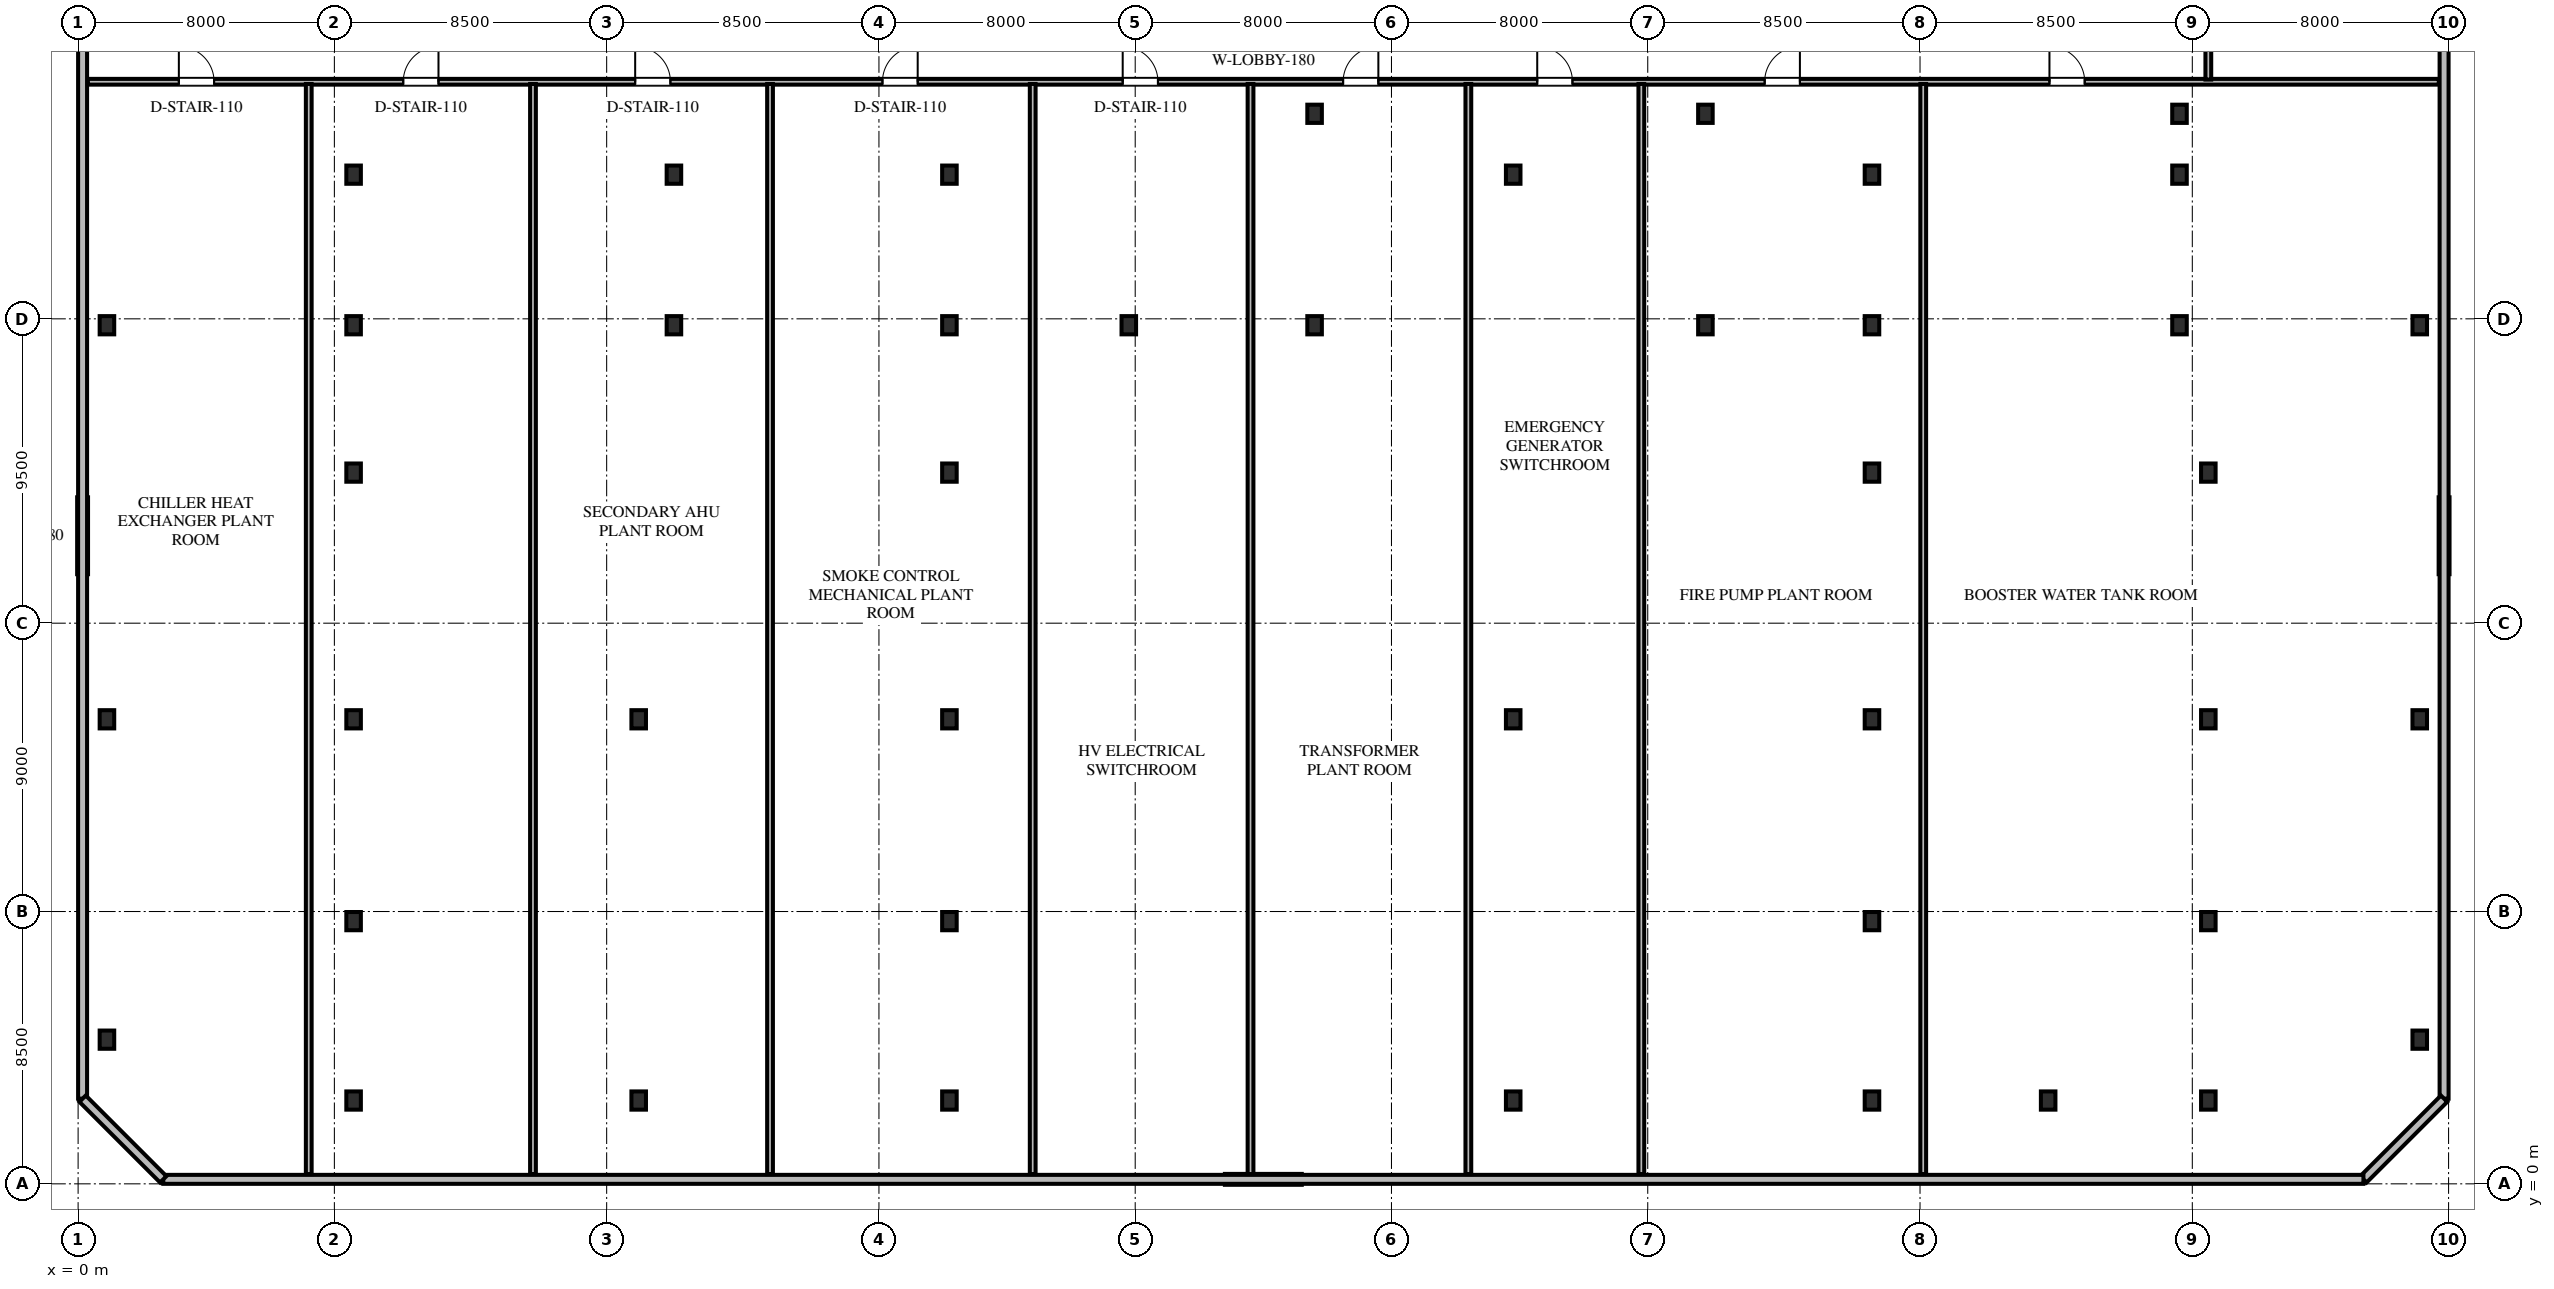
"""IFC4 building model, lengths in metres.
Left out: names, types, materials, properties, quantities, classifications, styles, units other than length and angle.
Written with IfcOpenShell. Run it as: python <this file> out.ifc"""

import sys

from ifc_helpers import new_model, si_unit, direction, frame, frame_2d, origin, origin_2d, place, context, subcontext, project, spatial, rectangle, i_section, extrude, element, fill, save


model = new_model("IFC4")
c1 = context("Model", 3, precision=1e-05, world=origin(), true_north=direction((0.0, 1.0)))
c2 = subcontext(c1, "Body", "Model", "MODEL_VIEW")
j1 = project(units=[si_unit("LENGTHUNIT", "METRE"), si_unit("PLANEANGLEUNIT", "RADIAN")], contexts=[c1])
p1 = place(None, origin())
s1 = spatial("IfcSite", under=j1, at=p1, CompositionType="ELEMENT")
p2 = place(p1, origin())
s2 = spatial("IfcBuilding", under=s1, at=p2, CompositionType="ELEMENT")
p3 = place(p2, frame((0.0, 0.0, 24.3)))
s3 = spatial("IfcBuildingStorey", under=s2, at=p3, CompositionType="ELEMENT", Elevation=24.3)
for number, where, z_axis, x_axis in (
    (1, (8.6, 2.6, 0.0), (0.0, 0.0, 1.0), (1.0, 0.0, 0.0)),
    (2, (17.5, 2.6, 0.0), (0.0, 0.0, 1.0), (1.0, 0.0, 0.0)),
    (3, (27.2, 2.6, 0.0), (0.0, 0.0, 1.0), (1.0, 0.0, 0.0)),
    (4, (44.8, 2.6, 0.0), (0.0, 0.0, 1.0), (1.0, 0.0, 0.0)),
    (5, (56.0, 2.6, 0.0), (0.0, 0.0, 1.0), (1.0, 0.0, 0.0)),
    (6, (61.5, 2.6, 0.0), (0.0, 0.0, 1.0), (1.0, 0.0, 0.0)),
    (7, (66.5, 2.6, 0.0), (0.0, 0.0, 1.0), (1.0, 0.0, 0.0)),
    (8, (8.6, 8.2, 0.0), (0.0, 0.0, 1.0), (1.0, 0.0, 0.0)),
    (9, (27.2, 8.2, 0.0), (0.0, 0.0, 1.0), (1.0, 0.0, 0.0)),
    (10, (56.0, 8.2, 0.0), (0.0, 0.0, 1.0), (1.0, 0.0, 0.0)),
    (11, (66.5, 8.2, 0.0), (0.0, 0.0, 1.0), (1.0, 0.0, 0.0)),
    (12, (8.6, 14.5, 0.0), (0.0, 0.0, 1.0), (1.0, 0.0, 0.0)),
    (13, (17.5, 14.5, 0.0), (0.0, 0.0, 1.0), (1.0, 0.0, 0.0)),
    (14, (27.2, 14.5, 0.0), (0.0, 0.0, 1.0), (1.0, 0.0, 0.0)),
    (15, (44.8, 14.5, 0.0), (0.0, 0.0, 1.0), (1.0, 0.0, 0.0)),
    (16, (56.0, 14.5, 0.0), (0.0, 0.0, 1.0), (1.0, 0.0, 0.0)),
    (17, (66.5, 14.5, 0.0), (0.0, 0.0, 1.0), (1.0, 0.0, 0.0)),
    (18, (8.6, 22.2, 0.0), (0.0, 0.0, 1.0), (1.0, 0.0, 0.0)),
    (19, (27.2, 22.2, 0.0), (0.0, 0.0, 1.0), (1.0, 0.0, 0.0)),
    (20, (56.0, 22.2, 0.0), (0.0, 0.0, 1.0), (1.0, 0.0, 0.0)),
    (21, (66.5, 22.2, 0.0), (0.0, 0.0, 1.0), (1.0, 0.0, 0.0)),
    (22, (8.6, 26.8, 0.0), (0.0, 0.0, 1.0), (1.0, 0.0, 0.0)),
    (23, (18.6, 26.8, 0.0), (0.0, 0.0, 1.0), (1.0, 0.0, 0.0)),
    (24, (27.2, 26.8, 0.0), (0.0, 0.0, 1.0), (1.0, 0.0, 0.0)),
    (25, (32.8, 26.8, 0.0), (0.0, 0.0, 1.0), (1.0, 0.0, 0.0)),
    (26, (38.6, 26.8, 0.0), (0.0, 0.0, 1.0), (1.0, 0.0, 0.0)),
    (27, (50.8, 26.8, 0.0), (0.0, 0.0, 1.0), (1.0, 0.0, 0.0)),
    (28, (56.0, 26.8, 0.0), (0.0, 0.0, 1.0), (1.0, 0.0, 0.0)),
    (29, (65.6, 26.8, 0.0), (0.0, 0.0, 1.0), (1.0, 0.0, 0.0)),
    (30, (8.6, 31.5, 0.0), (0.0, 0.0, 1.0), (1.0, 0.0, 0.0)),
    (31, (18.6, 31.5, 0.0), (0.0, 0.0, 1.0), (1.0, 0.0, 0.0)),
    (32, (27.2, 31.5, 0.0), (0.0, 0.0, 1.0), (1.0, 0.0, 0.0)),
    (33, (44.8, 31.5, 0.0), (0.0, 0.0, 1.0), (1.0, 0.0, 0.0)),
    (34, (56.0, 31.5, 0.0), (0.0, 0.0, 1.0), (1.0, 0.0, 0.0)),
    (35, (65.6, 31.5, 0.0), (0.0, 0.0, 1.0), (1.0, 0.0, 0.0)),
    (36, (0.9, 4.5, 0.0), (0.0, 0.0, 1.0), (1.0, 0.0, 0.0)),
    (37, (0.9, 14.5, 0.0), (0.0, 0.0, 1.0), (1.0, 0.0, 0.0)),
    (38, (0.9, 26.8, 0.0), (0.0, 0.0, 1.0), (1.0, 0.0, 0.0)),
    (39, (73.1, 4.5, 0.0), (0.0, 0.0, 1.0), (1.0, 0.0, 0.0)),
    (40, (73.1, 14.5, 0.0), (0.0, 0.0, 1.0), (1.0, 0.0, 0.0)),
    (41, (73.1, 26.8, 0.0), (0.0, 0.0, 1.0), (1.0, 0.0, 0.0)),
    (42, (38.6, 33.4, 0.0), (0.0, 0.0, 1.0), (1.0, 0.0, 0.0)),
    (43, (50.8, 33.4, 0.0), (0.0, 0.0, 1.0), (1.0, 0.0, 0.0)),
    (44, (65.6, 33.4, 0.0), (0.0, 0.0, 1.0), (1.0, 0.0, 0.0)),
):
    element("IfcColumn", number, at=place(p3, frame(where, z_axis=z_axis, x_axis=x_axis)), inside=s3, PredefinedType="COLUMN", context=c2, shape_type="SweptSolid", body=[
        extrude(i_section(OverallWidth=0.454, OverallDepth=0.569, WebThickness=0.078, FlangeThickness=0.125, FilletRadius=0.03, at=origin_2d()), origin(), (0.0, 0.0, 1.0), 5.2),
    ])
for number, where, z_axis, x_axis in (
    (45, (0.14, 2.658, 0.0), (0.0, 0.0, 1.0), (0.0, 1.0, 0.0)),
    (46, (73.86, 37.8, 0.0), (0.0, 0.0, 1.0), (0.0, -1.0, 0.0)),
):
    element("IfcWall", number, at=place(p3, frame(where, z_axis=z_axis, x_axis=x_axis)), inside=s3, PredefinedType="STANDARD", context=c2, shape_type="SweptSolid", body=[
        extrude(rectangle(XDim=35.142, YDim=0.28, at=frame_2d((17.571, 0.0))), origin(), (0.0, 0.0, 1.0), 4.94),
    ])
p4 = place(p3, frame((73.86, 2.658, 0.0), z_axis=(0.0, 0.0, 1.0), x_axis=(-0.707106781187, -0.707106781187, 0.0)))
e47 = element("IfcWall", 47, at=p4, inside=s3, PredefinedType="STANDARD", context=c2, shape_type="SweptSolid", body=[
    extrude(rectangle(XDim=3.561, YDim=0.28, at=frame_2d((1.781, 0.0))), origin(), (0.0, 0.0, 1.0), 4.94),
])
p5 = place(p3, frame((71.342, 0.14, 0.0), z_axis=(0.0, 0.0, 1.0), x_axis=(-1.0, 0.0, 0.0)))
e48 = element("IfcWall", 48, at=p5, inside=s3, PredefinedType="STANDARD", context=c2, shape_type="SweptSolid", body=[
    extrude(rectangle(XDim=68.684, YDim=0.28, at=frame_2d((34.342, 0.0))), origin(), (0.0, 0.0, 1.0), 4.94),
])
p6 = place(p3, frame((2.658, 0.14, 0.0), z_axis=(0.0, 0.0, 1.0), x_axis=(-0.707106781187, 0.707106781187, 0.0)))
e49 = element("IfcWall", 49, at=p6, inside=s3, PredefinedType="STANDARD", context=c2, shape_type="SweptSolid", body=[
    extrude(rectangle(XDim=3.561, YDim=0.28, at=frame_2d((1.781, 0.0))), origin(), (0.0, 0.0, 1.0), 4.94),
])
p7 = place(p3, frame((0.305, 34.4, 0.0), z_axis=(0.0, 0.0, 1.0), x_axis=(1.0, 0.0, 0.0)))
e50 = element("IfcWall", 50, at=p7, inside=s3, PredefinedType="STANDARD", context=c2, shape_type="SweptSolid", body=[
    extrude(rectangle(XDim=73.39, YDim=0.18, at=frame_2d((36.695, 0.0))), origin(), (0.0, 0.0, 1.0), 3.14),
])
p8 = place(p7, frame((2.84, 0.0, 0.0)))
e51 = element("IfcOpeningElement", 51, at=p8, cuts=e50, PredefinedType="OPENING", context=c2, shape_type="SweptSolid", body=[
    extrude(rectangle(XDim=1.1, YDim=2.2, at=frame_2d((0.55, 1.1))), frame((0.0, 0.1, 0.0), z_axis=(0.0, -1.0, 0.0), x_axis=(1.0, 0.0, 0.0)), (0.0, 0.0, 1.0), 0.2),
])
p9 = place(p7, frame((9.845, 0.0, 0.0)))
e52 = element("IfcOpeningElement", 52, at=p9, cuts=e50, PredefinedType="OPENING", context=c2, shape_type="SweptSolid", body=[
    extrude(rectangle(XDim=1.1, YDim=2.2, at=frame_2d((0.55, 1.1))), frame((0.0, 0.1, 0.0), z_axis=(0.0, -1.0, 0.0), x_axis=(1.0, 0.0, 0.0)), (0.0, 0.0, 1.0), 0.2),
])
p10 = place(p7, frame((17.085, 0.0, 0.0)))
e53 = element("IfcOpeningElement", 53, at=p10, cuts=e50, PredefinedType="OPENING", context=c2, shape_type="SweptSolid", body=[
    extrude(rectangle(XDim=1.1, YDim=2.2, at=frame_2d((0.55, 1.1))), frame((0.0, 0.1, 0.0), z_axis=(0.0, -1.0, 0.0), x_axis=(1.0, 0.0, 0.0)), (0.0, 0.0, 1.0), 0.2),
])
p11 = place(p7, frame((24.805, 0.0, 0.0)))
e54 = element("IfcOpeningElement", 54, at=p11, cuts=e50, PredefinedType="OPENING", context=c2, shape_type="SweptSolid", body=[
    extrude(rectangle(XDim=1.1, YDim=2.2, at=frame_2d((0.55, 1.1))), frame((0.0, 0.1, 0.0), z_axis=(0.0, -1.0, 0.0), x_axis=(1.0, 0.0, 0.0)), (0.0, 0.0, 1.0), 0.2),
])
p12 = place(p7, frame((32.304, 0.0, 0.0)))
e55 = element("IfcOpeningElement", 55, at=p12, cuts=e50, PredefinedType="OPENING", context=c2, shape_type="SweptSolid", body=[
    extrude(rectangle(XDim=1.1, YDim=2.2, at=frame_2d((0.55, 1.1))), frame((0.0, 0.1, 0.0), z_axis=(0.0, -1.0, 0.0), x_axis=(1.0, 0.0, 0.0)), (0.0, 0.0, 1.0), 0.2),
])
p13 = place(p7, frame((39.186, 0.0, 0.0)))
e56 = element("IfcOpeningElement", 56, at=p13, cuts=e50, PredefinedType="OPENING", context=c2, shape_type="SweptSolid", body=[
    extrude(rectangle(XDim=1.1, YDim=2.2, at=frame_2d((0.55, 1.1))), frame((0.0, 0.1, 0.0), z_axis=(0.0, -1.0, 0.0), x_axis=(1.0, 0.0, 0.0)), (0.0, 0.0, 1.0), 0.2),
])
p14 = place(p7, frame((45.245, 0.0, 0.0)))
e57 = element("IfcOpeningElement", 57, at=p14, cuts=e50, PredefinedType="OPENING", context=c2, shape_type="SweptSolid", body=[
    extrude(rectangle(XDim=1.1, YDim=2.2, at=frame_2d((0.55, 1.1))), frame((0.0, 0.1, 0.0), z_axis=(0.0, -1.0, 0.0), x_axis=(1.0, 0.0, 0.0)), (0.0, 0.0, 1.0), 0.2),
])
p15 = place(p7, frame((52.345, 0.0, 0.0)))
e58 = element("IfcOpeningElement", 58, at=p15, cuts=e50, PredefinedType="OPENING", context=c2, shape_type="SweptSolid", body=[
    extrude(rectangle(XDim=1.1, YDim=2.2, at=frame_2d((0.55, 1.1))), frame((0.0, 0.1, 0.0), z_axis=(0.0, -1.0, 0.0), x_axis=(1.0, 0.0, 0.0)), (0.0, 0.0, 1.0), 0.2),
])
p16 = place(p7, frame((61.235, 0.0, 0.0)))
e59 = element("IfcOpeningElement", 59, at=p16, cuts=e50, PredefinedType="OPENING", context=c2, shape_type="SweptSolid", body=[
    extrude(rectangle(XDim=1.1, YDim=2.2, at=frame_2d((0.55, 1.1))), frame((0.0, 0.1, 0.0), z_axis=(0.0, -1.0, 0.0), x_axis=(1.0, 0.0, 0.0)), (0.0, 0.0, 1.0), 0.2),
])
p17 = place(p3, frame((66.5, 34.468, 0.0), z_axis=(0.0, 0.0, 1.0), x_axis=(0.0, 1.0, 0.0)))
e60 = element("IfcWall", 60, at=p17, inside=s3, PredefinedType="STANDARD", context=c2, shape_type="SweptSolid", body=[
    extrude(rectangle(XDim=3.099, YDim=0.18, at=frame_2d((1.549, 0.0))), origin(), (0.0, 0.0, 1.0), 3.992),
])
p18 = place(p3, frame((7.2, 0.305, 0.0), z_axis=(0.0, 0.0, 1.0), x_axis=(0.0, 1.0, 0.0)))
e61 = element("IfcWall", 61, at=p18, inside=s3, PredefinedType="STANDARD", context=c2, shape_type="SweptSolid", body=[
    extrude(rectangle(XDim=34.027, YDim=0.18, at=frame_2d((17.014, 0.0))), origin(), (0.0, 0.0, 1.0), 3.992),
])
for number, where, z_axis, x_axis in (
    (62, (14.2, 0.305, 0.0), (0.0, 0.0, 1.0), (0.0, 1.0, 0.0)),
    (63, (21.6, 0.305, 0.0), (0.0, 0.0, 1.0), (0.0, 1.0, 0.0)),
):
    element("IfcWall", number, at=place(p3, frame(where, z_axis=z_axis, x_axis=x_axis)), inside=s3, PredefinedType="STANDARD", context=c2, shape_type="SweptSolid", body=[
        extrude(rectangle(XDim=34.027, YDim=0.18, at=frame_2d((17.014, 0.0))), origin(), (0.0, 0.0, 1.0), 3.14),
    ])
for number, where, z_axis, x_axis in (
    (64, (29.8, 0.305, 0.0), (0.0, 0.0, 1.0), (0.0, 1.0, 0.0)),
    (65, (36.6, 0.305, 0.0), (0.0, 0.0, 1.0), (0.0, 1.0, 0.0)),
    (66, (43.4, 0.305, 0.0), (0.0, 0.0, 1.0), (0.0, 1.0, 0.0)),
):
    element("IfcWall", number, at=place(p3, frame(where, z_axis=z_axis, x_axis=x_axis)), inside=s3, PredefinedType="STANDARD", context=c2, shape_type="SweptSolid", body=[
        extrude(rectangle(XDim=34.027, YDim=0.18, at=frame_2d((17.014, 0.0))), origin(), (0.0, 0.0, 1.0), 3.899),
    ])
for number, where, z_axis, x_axis in (
    (67, (48.8, 0.305, 0.0), (0.0, 0.0, 1.0), (0.0, 1.0, 0.0)),
    (68, (57.6, 0.305, 0.0), (0.0, 0.0, 1.0), (0.0, 1.0, 0.0)),
):
    element("IfcWall", number, at=place(p3, frame(where, z_axis=z_axis, x_axis=x_axis)), inside=s3, PredefinedType="STANDARD", context=c2, shape_type="SweptSolid", body=[
        extrude(rectangle(XDim=34.027, YDim=0.18, at=frame_2d((17.014, 0.0))), origin(), (0.0, 0.0, 1.0), 3.14),
    ])
p19 = place(p8, origin())
e69 = element("IfcDoor", 69, at=p19, inside=s3, OperationType="SINGLE_SWING_LEFT", PredefinedType="DOOR", context=c2, shape_type="SweptSolid", body=[
    extrude(rectangle(XDim=1.1, YDim=2.2, at=frame_2d((0.55, 1.1))), frame((0.0, 0.025, 0.0), z_axis=(0.0, -1.0, 0.0), x_axis=(1.0, 0.0, 0.0)), (0.0, 0.0, 1.0), 0.05),
])
fill(e51, e69)
p20 = place(p9, origin())
e70 = element("IfcDoor", 70, at=p20, inside=s3, OperationType="SINGLE_SWING_RIGHT", PredefinedType="DOOR", context=c2, shape_type="SweptSolid", body=[
    extrude(rectangle(XDim=1.1, YDim=2.2, at=frame_2d((0.55, 1.1))), frame((0.0, 0.025, 0.0), z_axis=(0.0, -1.0, 0.0), x_axis=(1.0, 0.0, 0.0)), (0.0, 0.0, 1.0), 0.05),
])
fill(e52, e70)
p21 = place(p10, origin())
e71 = element("IfcDoor", 71, at=p21, inside=s3, OperationType="SINGLE_SWING_LEFT", PredefinedType="DOOR", context=c2, shape_type="SweptSolid", body=[
    extrude(rectangle(XDim=1.1, YDim=2.2, at=frame_2d((0.55, 1.1))), frame((0.0, 0.025, 0.0), z_axis=(0.0, -1.0, 0.0), x_axis=(1.0, 0.0, 0.0)), (0.0, 0.0, 1.0), 0.05),
])
fill(e53, e71)
p22 = place(p11, origin())
e72 = element("IfcDoor", 72, at=p22, inside=s3, OperationType="SINGLE_SWING_RIGHT", PredefinedType="DOOR", context=c2, shape_type="SweptSolid", body=[
    extrude(rectangle(XDim=1.1, YDim=2.2, at=frame_2d((0.55, 1.1))), frame((0.0, 0.025, 0.0), z_axis=(0.0, -1.0, 0.0), x_axis=(1.0, 0.0, 0.0)), (0.0, 0.0, 1.0), 0.05),
])
fill(e54, e72)
p23 = place(p12, origin())
e73 = element("IfcDoor", 73, at=p23, inside=s3, OperationType="SINGLE_SWING_LEFT", PredefinedType="DOOR", context=c2, shape_type="SweptSolid", body=[
    extrude(rectangle(XDim=1.1, YDim=2.2, at=frame_2d((0.55, 1.1))), frame((0.0, 0.025, 0.0), z_axis=(0.0, -1.0, 0.0), x_axis=(1.0, 0.0, 0.0)), (0.0, 0.0, 1.0), 0.05),
])
fill(e55, e73)
p24 = place(p13, origin())
e74 = element("IfcDoor", 74, at=p24, inside=s3, OperationType="SINGLE_SWING_RIGHT", PredefinedType="DOOR", context=c2, shape_type="SweptSolid", body=[
    extrude(rectangle(XDim=1.1, YDim=2.2, at=frame_2d((0.55, 1.1))), frame((0.0, 0.025, 0.0), z_axis=(0.0, -1.0, 0.0), x_axis=(1.0, 0.0, 0.0)), (0.0, 0.0, 1.0), 0.05),
])
fill(e56, e74)
p25 = place(p14, origin())
e75 = element("IfcDoor", 75, at=p25, inside=s3, OperationType="SINGLE_SWING_LEFT", PredefinedType="DOOR", context=c2, shape_type="SweptSolid", body=[
    extrude(rectangle(XDim=1.1, YDim=2.2, at=frame_2d((0.55, 1.1))), frame((0.0, 0.025, 0.0), z_axis=(0.0, -1.0, 0.0), x_axis=(1.0, 0.0, 0.0)), (0.0, 0.0, 1.0), 0.05),
])
fill(e57, e75)
p26 = place(p15, origin())
e76 = element("IfcDoor", 76, at=p26, inside=s3, OperationType="SINGLE_SWING_RIGHT", PredefinedType="DOOR", context=c2, shape_type="SweptSolid", body=[
    extrude(rectangle(XDim=1.1, YDim=2.2, at=frame_2d((0.55, 1.1))), frame((0.0, 0.025, 0.0), z_axis=(0.0, -1.0, 0.0), x_axis=(1.0, 0.0, 0.0)), (0.0, 0.0, 1.0), 0.05),
])
fill(e58, e76)
p27 = place(p16, origin())
e77 = element("IfcDoor", 77, at=p27, inside=s3, OperationType="SINGLE_SWING_LEFT", PredefinedType="DOOR", context=c2, shape_type="SweptSolid", body=[
    extrude(rectangle(XDim=1.1, YDim=2.2, at=frame_2d((0.55, 1.1))), frame((0.0, 0.025, 0.0), z_axis=(0.0, -1.0, 0.0), x_axis=(1.0, 0.0, 0.0)), (0.0, 0.0, 1.0), 0.05),
])
fill(e59, e77)
save(model, sys.argv[1])
